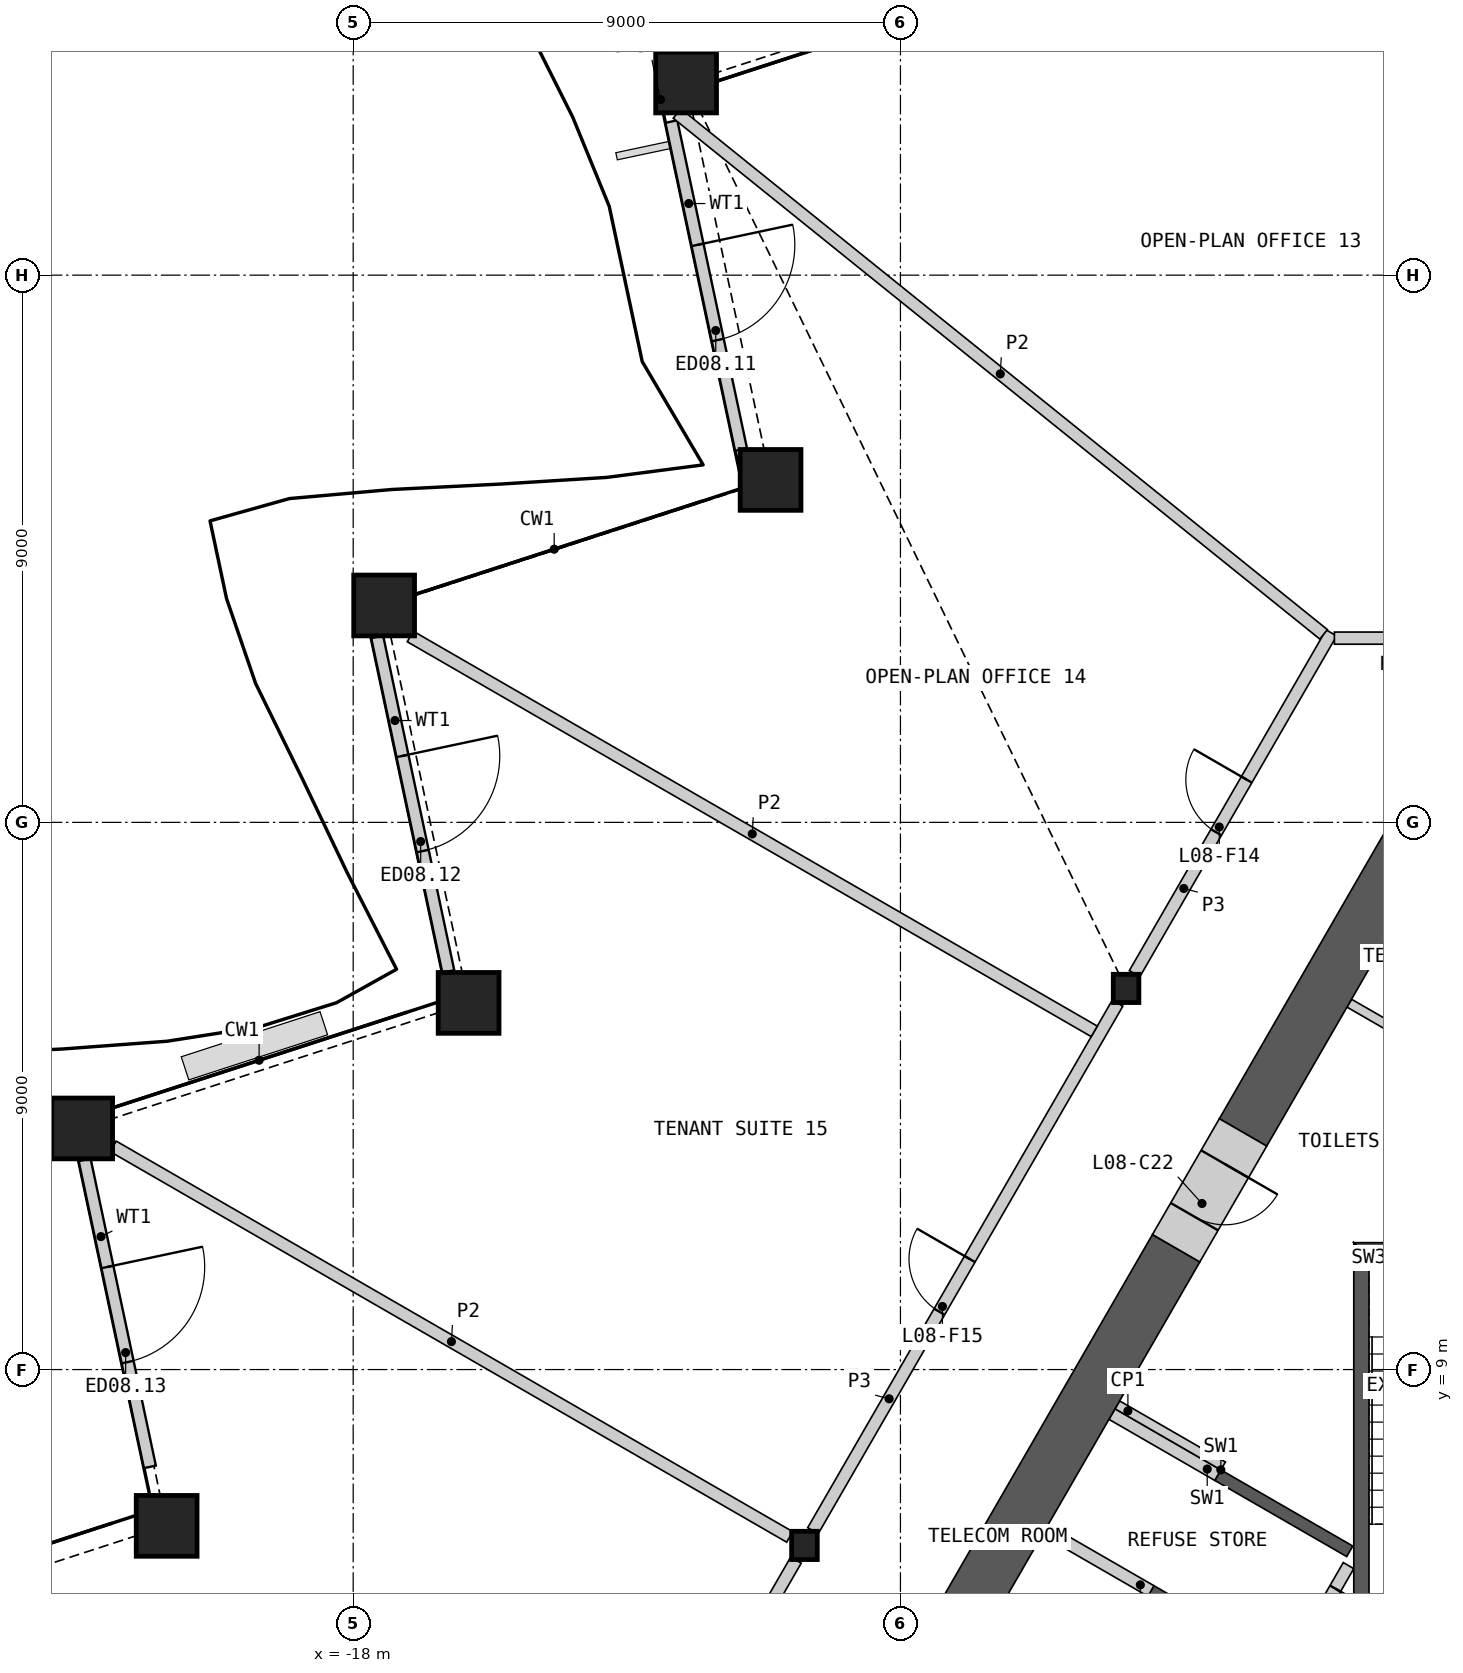
"""IFC4 building model, lengths in metres.
Left out: names, types, materials, properties, quantities, classifications, styles, units other than length and angle.
Written with IfcOpenShell. Run it as: python <this file> out.ifc"""

import sys

from ifc_helpers import new_model, si_unit, direction, frame, frame_2d, origin, origin_2d, place, context, subcontext, project, spatial, polyline, rectangle, hollow_rectangle, i_section, outline, extrude, element, fill, save


model = new_model("IFC4")
c1 = context("Model", 3, precision=1e-05, world=origin(), true_north=direction((0.0, 1.0)))
c2 = subcontext(c1, "Body", "Model", "MODEL_VIEW")
j1 = project(units=[si_unit("LENGTHUNIT", "METRE"), si_unit("PLANEANGLEUNIT", "RADIAN")], contexts=[c1])
p1 = place(None, origin())
s1 = spatial("IfcSite", under=j1, at=p1, CompositionType="ELEMENT")
p2 = place(p1, origin())
s2 = spatial("IfcBuilding", under=s1, at=p2, CompositionType="ELEMENT")
p3 = place(p2, frame((0.0, 0.0, 42.6)))
s3 = spatial("IfcBuildingStorey", under=s2, at=p3, CompositionType="ELEMENT", Elevation=42.6)
for number, where, z_axis, x_axis in (
    (1, (-12.525, 30.169, 0.0), (0.0, 0.0, 1.0), (1.0, 0.0, 0.0)),
    (2, (-11.136, 23.632, 0.0), (0.0, 0.0, 1.0), (1.0, 0.0, 0.0)),
    (3, (-17.491, 21.567, 0.0), (0.0, 0.0, 1.0), (1.0, 0.0, 0.0)),
    (4, (-16.102, 15.031, 0.0), (0.0, 0.0, 1.0), (1.0, 0.0, 0.0)),
    (5, (-22.457, 12.966, 0.0), (0.0, 0.0, 1.0), (1.0, 0.0, 0.0)),
    (6, (-21.068, 6.429, 0.0), (0.0, 0.0, 1.0), (1.0, 0.0, 0.0)),
):
    element("IfcColumn", number, at=place(p3, frame(where, z_axis=z_axis, x_axis=x_axis)), inside=s3, PredefinedType="COLUMN", context=c2, shape_type="SweptSolid", body=[
        extrude(hollow_rectangle(XDim=1.0, YDim=1.0, WallThickness=0.07, at=origin_2d()), origin(), (0.0, 0.0, 1.0), 4.2),
    ])
for number, where, z_axis, x_axis in (
    (7, (-5.289, 15.269, 0.0), (0.0, 0.0, 1.0), (1.0, 0.0, 0.0)),
    (8, (-10.578, 6.107, 0.0), (0.0, 0.0, 1.0), (1.0, 0.0, 0.0)),
):
    element("IfcColumn", number, at=place(p3, frame(where, z_axis=z_axis, x_axis=x_axis)), inside=s3, PredefinedType="COLUMN", context=c2, shape_type="SweptSolid", body=[
        extrude(i_section(OverallWidth=0.421, OverallDepth=0.465, WebThickness=0.045, FlangeThickness=0.072, at=origin_2d()), origin(), (0.0, 0.0, 1.0), 4.2),
    ])
p4 = place(p3, frame((-12.768, 29.526, 0.0), z_axis=(0.0, 0.0, 1.0), x_axis=(0.207902173992, -0.978149623549, 0.0)))
e9 = element("IfcWall", 9, at=p4, inside=s3, PredefinedType="SOLIDWALL", context=c2, shape_type="SweptSolid", body=[
    extrude(rectangle(XDim=5.515, YDim=0.2, at=frame_2d((2.757, 0.0))), origin(), (0.0, 0.0, 1.0), 3.189),
])
p5 = place(p4, frame((2.073, 0.0, 0.0)))
e10 = element("IfcOpeningElement", 10, at=p5, cuts=e9, PredefinedType="OPENING", context=c2, shape_type="SweptSolid", body=[
    extrude(rectangle(XDim=1.6, YDim=2.4, at=frame_2d((0.8, 1.2))), frame((0.0, 0.11, 0.0), z_axis=(0.0, -1.0, 0.0), x_axis=(1.0, 0.0, 0.0)), (0.0, 0.0, 1.0), 0.22),
])
p6 = place(p3, frame((-17.605, 21.051, 0.0), z_axis=(0.0, 0.0, 1.0), x_axis=(0.207901831982, -0.978149696242, 0.0)))
e11 = element("IfcWall", 11, at=p6, inside=s3, PredefinedType="SOLIDWALL", context=c2, shape_type="SweptSolid", body=[
    extrude(rectangle(XDim=5.626, YDim=0.2, at=frame_2d((2.813, 0.0))), origin(), (0.0, 0.0, 1.0), 3.189),
])
p7 = place(p6, frame((2.001, 0.0, 0.0)))
e12 = element("IfcOpeningElement", 12, at=p7, cuts=e11, PredefinedType="OPENING", context=c2, shape_type="SweptSolid", body=[
    extrude(rectangle(XDim=1.6, YDim=2.4, at=frame_2d((0.8, 1.2))), frame((0.0, 0.11, 0.0), z_axis=(0.0, -1.0, 0.0), x_axis=(1.0, 0.0, 0.0)), (0.0, 0.0, 1.0), 0.22),
])
p8 = place(p3, frame((-22.416, 12.449, 0.0), z_axis=(0.0, 0.0, 1.0), x_axis=(0.207907400709, -0.978148512615, 0.0)))
e13 = element("IfcWall", 13, at=p8, inside=s3, PredefinedType="SOLIDWALL", context=c2, shape_type="SweptSolid", body=[
    extrude(rectangle(XDim=5.162, YDim=0.2, at=frame_2d((2.581, 0.0))), origin(), (0.0, 0.0, 1.0), 3.189),
])
p9 = place(p8, frame((1.8, 0.0, 0.0)))
e14 = element("IfcOpeningElement", 14, at=p9, cuts=e13, PredefinedType="OPENING", context=c2, shape_type="SweptSolid", body=[
    extrude(rectangle(XDim=1.6, YDim=2.4, at=frame_2d((0.8, 1.2))), frame((0.0, 0.11, 0.0), z_axis=(0.0, -1.0, 0.0), x_axis=(1.0, 0.0, 0.0)), (0.0, 0.0, 1.0), 0.22),
])
p10 = place(p3, origin())
e15 = element("IfcWall", 15, at=p10, inside=s3, PredefinedType="SHEAR", context=c2, shape_type="SweptSolid", body=[
    extrude(outline(polyline([(-2.76, 4.019), (-4.931, 5.272), (-4.831, 5.445), (-2.66, 4.192), (-2.76, 4.019)])), origin(), (0.0, 0.0, 1.0), 3.8),
])
p11 = place(p3, origin())
e16 = element("IfcWall", 16, at=p11, inside=s3, PredefinedType="SHEAR", context=c2, shape_type="SweptSolid", body=[
    extrude(outline(polyline([(-3.731, 7.35), (-1.561, 6.097), (-1.66, 5.924), (-3.831, 7.177), (-3.731, 7.35)])), origin(), (0.0, 0.0, 1.0), 3.8),
])
p12 = place(p3, frame((-1.631, 5.776, 0.0), z_axis=(0.0, 0.0, 1.0), x_axis=(-0.499992876559, -0.866029516466, 0.0)))
e17 = element("IfcWall", 17, at=p12, inside=s3, PredefinedType="SOLIDWALL", context=c2, shape_type="SweptSolid", body=[
    extrude(rectangle(XDim=6.486, YDim=0.2, at=frame_2d((3.243, 0.0))), origin(), (0.0, 0.0, 1.0), 3.8),
])
p13 = place(p12, frame((0.437, 0.0, 0.0)))
e18 = element("IfcOpeningElement", 18, at=p13, cuts=e17, PredefinedType="OPENING", context=c2, shape_type="SweptSolid", body=[
    extrude(rectangle(XDim=0.9, YDim=2.1, at=frame_2d((0.45, 1.05))), frame((0.0, 0.11, 0.0), z_axis=(0.0, -1.0, 0.0), x_axis=(1.0, 0.0, 0.0)), (0.0, 0.0, 1.0), 0.22),
])
p14 = place(p12, frame((2.637, 0.0, 0.0)))
e19 = element("IfcOpeningElement", 19, at=p14, cuts=e17, PredefinedType="OPENING", context=c2, shape_type="SweptSolid", body=[
    extrude(rectangle(XDim=0.9, YDim=2.1, at=frame_2d((0.45, 1.05))), frame((0.0, 0.11, 0.0), z_axis=(0.0, -1.0, 0.0), x_axis=(1.0, 0.0, 0.0)), (0.0, 0.0, 1.0), 0.22),
])
p15 = place(p3, frame((-3.781, 7.263, 0.0), z_axis=(0.0, 0.0, 1.0), x_axis=(-0.865983199114, 0.50007309351, 0.0)))
e20 = element("IfcWall", 20, at=p15, inside=s3, PredefinedType="SHEAR", context=c2, shape_type="SweptSolid", body=[
    extrude(rectangle(XDim=2.009, YDim=0.2, at=frame_2d((1.004, 0.0))), origin(), (0.0, 0.0, 1.0), 3.8),
])
p16 = place(p3, frame((-4.881, 5.358, 0.0), z_axis=(0.0, 0.0, 1.0), x_axis=(-0.866035824272, 0.499981950752, 0.0)))
e21 = element("IfcWall", 21, at=p16, inside=s3, PredefinedType="SHEAR", context=c2, shape_type="SweptSolid", body=[
    extrude(rectangle(XDim=2.009, YDim=0.2, at=frame_2d((1.004, 0.0))), origin(), (0.0, 0.0, 1.0), 3.8),
])
p17 = place(p3, origin())
e22 = element("IfcWall", 22, at=p17, inside=s3, PredefinedType="SHEAR", context=c2, shape_type="SweptSolid", body=[
    extrude(outline(polyline([(1.544, 11.087), (-1.544, 11.087), (-1.294, 10.837), (1.294, 10.837), (1.544, 11.087)])), origin(), (0.0, 0.0, 1.0), 3.8),
])
p18 = place(p3, origin())
e23 = element("IfcWall", 23, at=p18, inside=s3, PredefinedType="SHEAR", context=c2, shape_type="SweptSolid", body=[
    extrude(outline(polyline([(-1.294, 10.837), (-1.544, 11.087), (-1.544, 5.237), (-1.294, 5.237), (-1.294, 10.837)])), origin(), (0.0, 0.0, 1.0), 3.8),
])
p19 = place(p3, frame((-3.693, 7.415, 0.0), z_axis=(0.0, 0.0, 1.0), x_axis=(-0.866035824272, 0.499981950752, 0.0)))
e24 = element("IfcWall", 24, at=p19, inside=s3, PredefinedType="PARTITIONING", context=c2, shape_type="SweptSolid", body=[
    extrude(rectangle(XDim=2.009, YDim=0.15, at=frame_2d((1.004, 0.0))), origin(), (0.0, 0.0, 1.0), 3.8),
])
p20 = place(p3, frame((-1.619, 15.026, 0.0), z_axis=(0.0, 0.0, 1.0), x_axis=(0.866015917575, -0.500016430238, 0.0)))
e25 = element("IfcWall", 25, at=p20, inside=s3, PredefinedType="PARTITIONING", context=c2, shape_type="SweptSolid", body=[
    extrude(rectangle(XDim=5.607, YDim=0.15, at=frame_2d((2.804, 0.0))), origin(), (0.0, 0.0, 1.0), 3.8),
])
p21 = place(p3, frame((-4.466, 10.995, 0.0), z_axis=(0.0, 0.0, 1.0), x_axis=(-0.500012427149, -0.866018228848, 0.0)))
e26 = element("IfcWall", 26, at=p21, inside=s3, PredefinedType="SHEAR", context=c2, shape_type="SweptSolid", body=[
    extrude(rectangle(XDim=7.409, YDim=0.9, at=frame_2d((3.705, 0.0))), origin(), (0.0, 0.0, 1.0), 3.8),
])
p22 = place(p3, frame((-0.39, 18.055, 0.0), z_axis=(0.0, 0.0, 1.0), x_axis=(-0.499981657175, -0.86603599376, 0.0)))
e27 = element("IfcWall", 27, at=p22, inside=s3, PredefinedType="SHEAR", context=c2, shape_type="SweptSolid", body=[
    extrude(rectangle(XDim=5.952, YDim=0.9, at=frame_2d((2.976, 0.0))), origin(), (0.0, 0.0, 1.0), 3.8),
])
p23 = place(p3, frame((-3.365, 12.9, 0.0), z_axis=(0.0, 0.0, 1.0), x_axis=(-0.500077893725, -0.86598042715, 0.0)))
e28 = element("IfcWall", 28, at=p23, inside=s3, PredefinedType="SHEAR", context=c2, shape_type="SweptSolid", body=[
    extrude(rectangle(XDim=2.2, YDim=0.9, at=frame_2d((1.1, 0.0))), origin(), (0.0, 0.0, 1.0), 3.8),
])
p24 = place(p23, frame((0.6, 0.0, 0.0)))
e29 = element("IfcOpeningElement", 29, at=p24, cuts=e28, PredefinedType="OPENING", context=c2, shape_type="SweptSolid", body=[
    extrude(rectangle(XDim=1.0, YDim=2.1, at=frame_2d((0.5, 1.05))), frame((0.0, 0.46, 0.0), z_axis=(0.0, -1.0, 0.0), x_axis=(1.0, 0.0, 0.0)), (0.0, 0.0, 1.0), 0.92),
])
p25 = place(p3, frame((-10.439, 6.35, 0.0), z_axis=(0.0, 0.0, 1.0), x_axis=(0.50001002959, 0.86601961312, 0.0)))
e30 = element("IfcWall", 30, at=p25, inside=s3, PredefinedType="PARTITIONING", context=c2, shape_type="SweptSolid", body=[
    extrude(rectangle(XDim=10.019, YDim=0.2, at=frame_2d((5.009, 0.0))), origin(), (0.0, 0.0, 1.0), 3.8),
])
p26 = place(p25, frame((4.159, 0.0, 0.0)))
e31 = element("IfcOpeningElement", 31, at=p26, cuts=e30, PredefinedType="OPENING", context=c2, shape_type="SweptSolid", body=[
    extrude(rectangle(XDim=1.0, YDim=2.1, at=frame_2d((0.5, 1.05))), frame((0.0, 0.11, 0.0), z_axis=(0.0, -1.0, 0.0), x_axis=(1.0, 0.0, 0.0)), (0.0, 0.0, 1.0), 0.22),
])
p27 = place(p3, frame((-15.728, -2.811, 0.0), z_axis=(0.0, 0.0, 1.0), x_axis=(0.49999175339, 0.866030164915, 0.0)))
e32 = element("IfcWall", 32, at=p27, inside=s3, PredefinedType="PARTITIONING", context=c2, shape_type="SweptSolid", body=[
    extrude(rectangle(XDim=10.019, YDim=0.2, at=frame_2d((5.009, 0.0))), origin(), (0.0, 0.0, 1.0), 3.8),
])
p28 = place(p27, frame((4.059, 0.0, 0.0)))
e33 = element("IfcOpeningElement", 33, at=p28, cuts=e32, PredefinedType="OPENING", context=c2, shape_type="SweptSolid", body=[
    extrude(rectangle(XDim=1.8, YDim=2.1, at=frame_2d((0.9, 1.05))), frame((0.0, 0.11, 0.0), z_axis=(0.0, -1.0, 0.0), x_axis=(1.0, 0.0, 0.0)), (0.0, 0.0, 1.0), 0.22),
])
p29 = place(p3, frame((-5.149, 15.511, 0.0), z_axis=(0.0, 0.0, 1.0), x_axis=(0.500001069878, 0.866024786089, 0.0)))
e34 = element("IfcWall", 34, at=p29, inside=s3, PredefinedType="PARTITIONING", context=c2, shape_type="SweptSolid", body=[
    extrude(rectangle(XDim=6.473, YDim=0.2, at=frame_2d((3.236, 0.0))), origin(), (0.0, 0.0, 1.0), 3.8),
])
p30 = place(p29, frame((2.686, 0.0, 0.0)))
e35 = element("IfcOpeningElement", 35, at=p30, cuts=e34, PredefinedType="OPENING", context=c2, shape_type="SweptSolid", body=[
    extrude(rectangle(XDim=1.0, YDim=2.1, at=frame_2d((0.5, 1.05))), frame((0.0, 0.11, 0.0), z_axis=(0.0, -1.0, 0.0), x_axis=(1.0, 0.0, 0.0)), (0.0, 0.0, 1.0), 0.22),
])
p31 = place(p3, frame((-1.863, 21.03, 0.0), z_axis=(0.0, 0.0, 1.0), x_axis=(1.0, 0.0, 0.0)))
e36 = element("IfcWall", 36, at=p31, inside=s3, PredefinedType="PARTITIONING", context=c2, shape_type="SweptSolid", body=[
    extrude(rectangle(XDim=3.726, YDim=0.2, at=frame_2d((1.863, 0.0))), origin(), (0.0, 0.0, 1.0), 3.8),
])
p32 = place(p31, frame((0.963, 0.0, 0.0)))
e37 = element("IfcOpeningElement", 37, at=p32, cuts=e36, PredefinedType="OPENING", context=c2, shape_type="SweptSolid", body=[
    extrude(rectangle(XDim=1.8, YDim=2.1, at=frame_2d((0.9, 1.05))), frame((0.0, 0.11, 0.0), z_axis=(0.0, -1.0, 0.0), x_axis=(1.0, 0.0, 0.0)), (0.0, 0.0, 1.0), 0.22),
])
p33 = place(p3, frame((-12.674, 29.659, 0.0), z_axis=(0.0, 0.0, 1.0), x_axis=(0.778730857737, -0.627358152261, 0.0)))
e38 = element("IfcWall", 38, at=p33, inside=s3, PredefinedType="PARTITIONING", context=c2, shape_type="SweptSolid", body=[
    extrude(rectangle(XDim=13.654, YDim=0.2, at=frame_2d((6.827, 0.0))), origin(), (0.0, 0.0, 1.0), 2.885),
])
p34 = place(p3, frame((-17.061, 21.057, 0.0), z_axis=(0.0, 0.0, 1.0), x_axis=(0.866020631549, -0.500008265664, 0.0)))
e39 = element("IfcWall", 39, at=p34, inside=s3, PredefinedType="PARTITIONING", context=c2, shape_type="SweptSolid", body=[
    extrude(rectangle(XDim=12.989, YDim=0.2, at=frame_2d((6.495, 0.0))), origin(), (0.0, 0.0, 1.0), 2.885),
])
p35 = place(p3, frame((-21.947, 12.671, 0.0), z_axis=(0.0, 0.0, 1.0), x_axis=(0.866026729935, -0.499997703033, 0.0)))
e40 = element("IfcWall", 40, at=p35, inside=s3, PredefinedType="PARTITIONING", context=c2, shape_type="SweptSolid", body=[
    extrude(rectangle(XDim=12.848, YDim=0.2, at=frame_2d((6.424, 0.0))), origin(), (0.0, 0.0, 1.0), 2.885),
])
p36 = place(p5, origin())
e41 = element("IfcDoor", 41, at=p36, inside=s3, OperationType="DOUBLE_DOOR_SINGLE_SWING", PredefinedType="DOOR", context=c2, shape_type="SweptSolid", body=[
    extrude(rectangle(XDim=1.6, YDim=2.4, at=frame_2d((0.8, 1.2))), frame((0.0, 0.025, 0.0), z_axis=(0.0, -1.0, 0.0), x_axis=(1.0, 0.0, 0.0)), (0.0, 0.0, 1.0), 0.05),
])
fill(e10, e41)
p37 = place(p7, origin())
e42 = element("IfcDoor", 42, at=p37, inside=s3, OperationType="DOUBLE_DOOR_SINGLE_SWING", PredefinedType="DOOR", context=c2, shape_type="SweptSolid", body=[
    extrude(rectangle(XDim=1.6, YDim=2.4, at=frame_2d((0.8, 1.2))), frame((0.0, 0.025, 0.0), z_axis=(0.0, -1.0, 0.0), x_axis=(1.0, 0.0, 0.0)), (0.0, 0.0, 1.0), 0.05),
])
fill(e12, e42)
p38 = place(p9, origin())
e43 = element("IfcDoor", 43, at=p38, inside=s3, OperationType="DOUBLE_DOOR_SINGLE_SWING", PredefinedType="DOOR", context=c2, shape_type="SweptSolid", body=[
    extrude(rectangle(XDim=1.6, YDim=2.4, at=frame_2d((0.8, 1.2))), frame((0.0, 0.025, 0.0), z_axis=(0.0, -1.0, 0.0), x_axis=(1.0, 0.0, 0.0)), (0.0, 0.0, 1.0), 0.05),
])
fill(e14, e43)
p39 = place(p13, origin())
e44 = element("IfcDoor", 44, at=p39, inside=s3, OperationType="SINGLE_SWING_LEFT", PredefinedType="DOOR", context=c2, shape_type="SweptSolid", body=[
    extrude(rectangle(XDim=0.9, YDim=2.1, at=frame_2d((0.45, 1.05))), frame((0.0, 0.025, 0.0), z_axis=(0.0, -1.0, 0.0), x_axis=(1.0, 0.0, 0.0)), (0.0, 0.0, 1.0), 0.05),
])
fill(e18, e44)
p40 = place(p24, origin())
e45 = element("IfcDoor", 45, at=p40, inside=s3, OperationType="SINGLE_SWING_LEFT", PredefinedType="DOOR", context=c2, shape_type="SweptSolid", body=[
    extrude(rectangle(XDim=1.0, YDim=2.1, at=frame_2d((0.5, 1.05))), frame((0.0, 0.205, 0.0), z_axis=(0.0, -1.0, 0.0), x_axis=(1.0, 0.0, 0.0)), (0.0, 0.0, 1.0), 0.05),
])
fill(e29, e45)
p41 = place(p30, origin())
e46 = element("IfcDoor", 46, at=p41, inside=s3, OperationType="SINGLE_SWING_RIGHT", PredefinedType="DOOR", context=c2, shape_type="SweptSolid", body=[
    extrude(rectangle(XDim=1.0, YDim=2.1, at=frame_2d((0.5, 1.05))), frame((0.0, 0.025, 0.0), z_axis=(0.0, -1.0, 0.0), x_axis=(1.0, 0.0, 0.0)), (0.0, 0.0, 1.0), 0.05),
])
fill(e35, e46)
p42 = place(p26, origin())
e47 = element("IfcDoor", 47, at=p42, inside=s3, OperationType="SINGLE_SWING_RIGHT", PredefinedType="DOOR", context=c2, shape_type="SweptSolid", body=[
    extrude(rectangle(XDim=1.0, YDim=2.1, at=frame_2d((0.5, 1.05))), frame((0.0, 0.025, 0.0), z_axis=(0.0, -1.0, 0.0), x_axis=(1.0, 0.0, 0.0)), (0.0, 0.0, 1.0), 0.05),
])
fill(e31, e47)
save(model, sys.argv[1])
